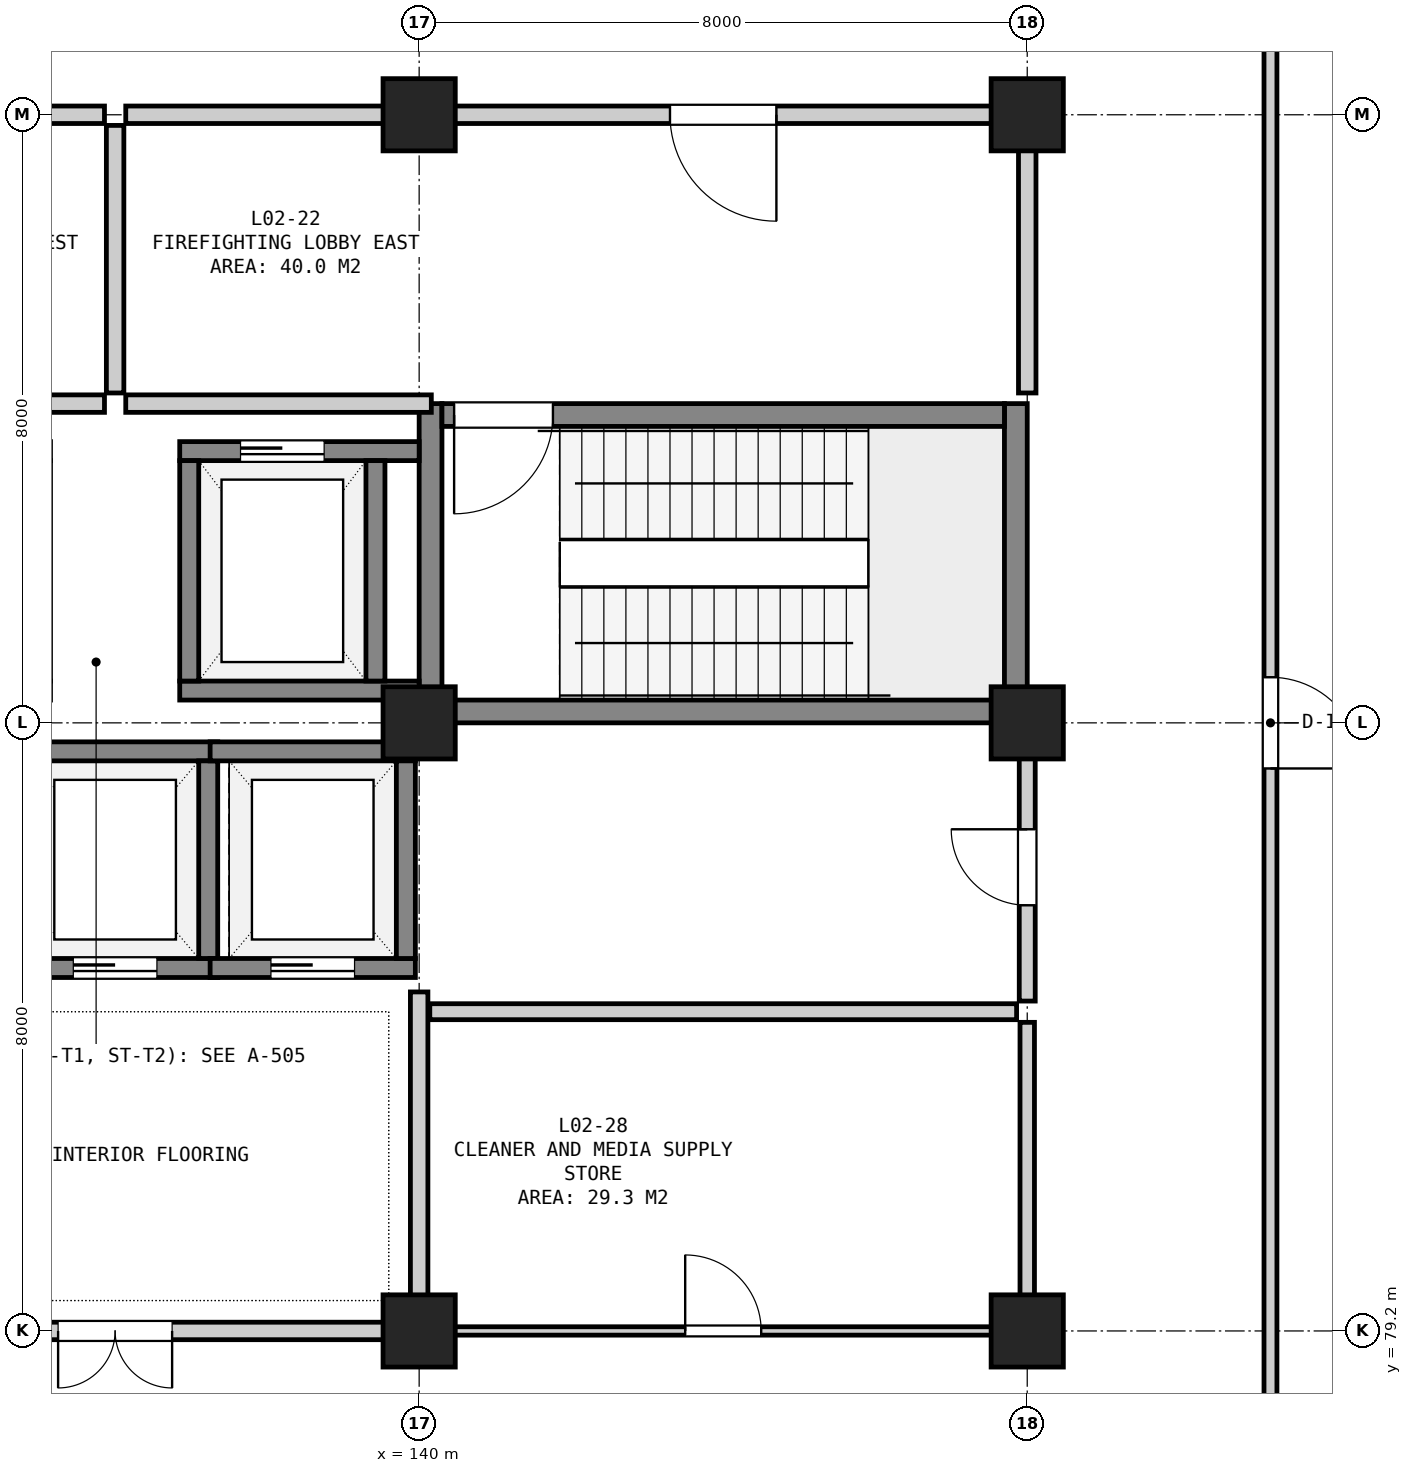
"""IFC4 building model, lengths in metres.
Left out: names, types, materials, properties, quantities, classifications, styles, units other than length and angle.
Written with IfcOpenShell. Run it as: python <this file> out.ifc"""

import sys

from ifc_helpers import new_model, si_unit, direction, frame, frame_2d, origin, origin_2d, place, context, subcontext, project, spatial, rectangle, extrude, element, fill, save


model = new_model("IFC4")
c1 = context("Model", 3, precision=1e-05, world=origin(), true_north=direction((0.0, 1.0)))
c2 = subcontext(c1, "Body", "Model", "MODEL_VIEW")
j1 = project(units=[si_unit("LENGTHUNIT", "METRE"), si_unit("PLANEANGLEUNIT", "RADIAN")], contexts=[c1])
p1 = place(None, origin())
s1 = spatial("IfcSite", under=j1, at=p1, CompositionType="ELEMENT")
p2 = place(p1, origin())
s2 = spatial("IfcBuilding", under=s1, at=p2, CompositionType="ELEMENT")
p3 = place(p2, frame((0.0, 0.0, 10.8)))
s3 = spatial("IfcBuildingStorey", under=s2, at=p3, CompositionType="ELEMENT", Elevation=10.8)
for number, where, z_axis, x_axis in (
    (1, (140.0, 79.2, 0.0), (0.0, 0.0, 1.0), (1.0, 0.0, 0.0)),
    (2, (140.0, 87.2, 0.0), (0.0, 0.0, 1.0), (1.0, 0.0, 0.0)),
    (3, (140.0, 95.2, 0.0), (0.0, 0.0, 1.0), (1.0, 0.0, 0.0)),
    (4, (148.0, 79.2, 0.0), (0.0, 0.0, 1.0), (1.0, 0.0, 0.0)),
    (5, (148.0, 87.2, 0.0), (0.0, 0.0, 1.0), (1.0, 0.0, 0.0)),
    (6, (148.0, 95.2, 0.0), (0.0, 0.0, 1.0), (1.0, 0.0, 0.0)),
):
    element("IfcColumn", number, at=place(p3, frame(where, z_axis=z_axis, x_axis=x_axis)), inside=s3, PredefinedType="COLUMN", context=c2, shape_type="SweptSolid", body=[
        extrude(rectangle(XDim=0.95, YDim=0.95, at=origin_2d()), origin(), (0.0, 0.0, 1.0), 4.8),
    ])
for number, where, z_axis, x_axis in (
    (7, (140.15, 87.2, 0.0), (0.0, 0.0, 1.0), (0.0, 1.0, 0.0)),
    (8, (147.85, 87.2, 0.0), (0.0, 0.0, 1.0), (0.0, 1.0, 0.0)),
):
    element("IfcWall", number, at=place(p3, frame(where, z_axis=z_axis, x_axis=x_axis)), inside=s3, PredefinedType="SHEAR", context=c2, shape_type="SweptSolid", body=[
        extrude(rectangle(XDim=4.2, YDim=0.3, at=frame_2d((2.1, 0.0))), origin(), (0.0, 0.0, 1.0), 4.5),
    ])
p4 = place(p3, frame((140.3, 87.35, 0.0), z_axis=(0.0, 0.0, 1.0), x_axis=(1.0, 0.0, 0.0)))
e9 = element("IfcWall", 9, at=p4, inside=s3, PredefinedType="SHEAR", context=c2, shape_type="SweptSolid", body=[
    extrude(rectangle(XDim=7.4, YDim=0.3, at=frame_2d((3.7, 0.0))), origin(), (0.0, 0.0, 1.0), 4.5),
])
p5 = place(p3, frame((140.3, 91.25, 0.0), z_axis=(0.0, 0.0, 1.0), x_axis=(1.0, 0.0, 0.0)))
e10 = element("IfcWall", 10, at=p5, inside=s3, PredefinedType="SHEAR", context=c2, shape_type="SweptSolid", body=[
    extrude(rectangle(XDim=7.4, YDim=0.3, at=frame_2d((3.7, 0.0))), origin(), (0.0, 0.0, 1.0), 4.5),
])
p6 = place(p5, frame((0.16, 0.0, 0.0)))
e11 = element("IfcOpeningElement", 11, at=p6, cuts=e10, PredefinedType="OPENING", context=c2, shape_type="SweptSolid", body=[
    extrude(rectangle(XDim=1.3, YDim=2.18, at=frame_2d((0.65, 1.09))), frame((0.0, 0.162, 0.0), z_axis=(0.0, -1.0, 0.0), x_axis=(1.0, 0.0, 0.0)), (0.0, 0.0, 1.0), 0.324),
])
p7 = place(p3, frame((136.85, 87.625, 0.0), z_axis=(0.0, 0.0, 1.0), x_axis=(1.0, 0.0, 0.0)))
e12 = element("IfcWall", 12, at=p7, inside=s3, PredefinedType="SHEAR", context=c2, shape_type="SweptSolid", body=[
    extrude(rectangle(XDim=3.15, YDim=0.25, at=frame_2d((1.575, 0.0))), origin(), (0.0, 0.0, 1.0), 4.5),
])
p8 = place(p3, frame((136.85, 90.775, 0.0), z_axis=(0.0, 0.0, 1.0), x_axis=(1.0, 0.0, 0.0)))
e13 = element("IfcWall", 13, at=p8, inside=s3, PredefinedType="SHEAR", context=c2, shape_type="SweptSolid", body=[
    extrude(rectangle(XDim=3.15, YDim=0.25, at=frame_2d((1.575, 0.0))), origin(), (0.0, 0.0, 1.0), 4.5),
])
p9 = place(p8, frame((0.8, 0.0, 0.0)))
e14 = element("IfcOpeningElement", 14, at=p9, cuts=e13, PredefinedType="OPENING", context=c2, shape_type="SweptSolid", body=[
    extrude(rectangle(XDim=1.1, YDim=2.15, at=frame_2d((0.55, 1.075))), frame((0.0, 0.137, 0.0), z_axis=(0.0, -1.0, 0.0), x_axis=(1.0, 0.0, 0.0)), (0.0, 0.0, 1.0), 0.274),
])
for number, where, z_axis, x_axis in (
    (15, (136.975, 87.75, 0.0), (0.0, 0.0, 1.0), (0.0, 1.0, 0.0)),
    (16, (139.425, 87.75, 0.0), (0.0, 0.0, 1.0), (0.0, 1.0, 0.0)),
):
    element("IfcWall", number, at=place(p3, frame(where, z_axis=z_axis, x_axis=x_axis)), inside=s3, PredefinedType="SHEAR", context=c2, shape_type="SweptSolid", body=[
        extrude(rectangle(XDim=2.9, YDim=0.25, at=frame_2d((1.45, 0.0))), origin(), (0.0, 0.0, 1.0), 4.5),
    ])
p10 = place(p3, frame((134.65, 83.975, 0.0), z_axis=(0.0, 0.0, 1.0), x_axis=(1.0, 0.0, 0.0)))
e17 = element("IfcWall", 17, at=p10, inside=s3, PredefinedType="SHEAR", context=c2, shape_type="SweptSolid", body=[
    extrude(rectangle(XDim=2.7, YDim=0.25, at=frame_2d((1.35, 0.0))), origin(), (0.0, 0.0, 1.0), 4.5),
])
p11 = place(p10, frame((0.8, 0.0, 0.0)))
e18 = element("IfcOpeningElement", 18, at=p11, cuts=e17, PredefinedType="OPENING", context=c2, shape_type="SweptSolid", body=[
    extrude(rectangle(XDim=1.1, YDim=2.15, at=frame_2d((0.55, 1.075))), frame((0.0, 0.137, 0.0), z_axis=(0.0, -1.0, 0.0), x_axis=(1.0, 0.0, 0.0)), (0.0, 0.0, 1.0), 0.274),
])
p12 = place(p3, frame((134.65, 86.825, 0.0), z_axis=(0.0, 0.0, 1.0), x_axis=(1.0, 0.0, 0.0)))
e19 = element("IfcWall", 19, at=p12, inside=s3, PredefinedType="SHEAR", context=c2, shape_type="SweptSolid", body=[
    extrude(rectangle(XDim=2.7, YDim=0.25, at=frame_2d((1.35, 0.0))), origin(), (0.0, 0.0, 1.0), 4.5),
])
p13 = place(p3, frame((137.225, 84.1, 0.0), z_axis=(0.0, 0.0, 1.0), x_axis=(0.0, 1.0, 0.0)))
e20 = element("IfcWall", 20, at=p13, inside=s3, PredefinedType="SHEAR", context=c2, shape_type="SweptSolid", body=[
    extrude(rectangle(XDim=2.6, YDim=0.25, at=frame_2d((1.3, 0.0))), origin(), (0.0, 0.0, 1.0), 4.5),
])
p14 = place(p3, frame((137.25, 83.975, 0.0), z_axis=(0.0, 0.0, 1.0), x_axis=(1.0, 0.0, 0.0)))
e21 = element("IfcWall", 21, at=p14, inside=s3, PredefinedType="SHEAR", context=c2, shape_type="SweptSolid", body=[
    extrude(rectangle(XDim=2.7, YDim=0.25, at=frame_2d((1.35, 0.0))), origin(), (0.0, 0.0, 1.0), 4.5),
])
p15 = place(p14, frame((0.8, 0.0, 0.0)))
e22 = element("IfcOpeningElement", 22, at=p15, cuts=e21, PredefinedType="OPENING", context=c2, shape_type="SweptSolid", body=[
    extrude(rectangle(XDim=1.1, YDim=2.15, at=frame_2d((0.55, 1.075))), frame((0.0, 0.137, 0.0), z_axis=(0.0, -1.0, 0.0), x_axis=(1.0, 0.0, 0.0)), (0.0, 0.0, 1.0), 0.274),
])
p16 = place(p3, frame((137.25, 86.825, 0.0), z_axis=(0.0, 0.0, 1.0), x_axis=(1.0, 0.0, 0.0)))
e23 = element("IfcWall", 23, at=p16, inside=s3, PredefinedType="SHEAR", context=c2, shape_type="SweptSolid", body=[
    extrude(rectangle(XDim=2.7, YDim=0.25, at=frame_2d((1.35, 0.0))), origin(), (0.0, 0.0, 1.0), 4.5),
])
p17 = place(p3, frame((139.825, 84.1, 0.0), z_axis=(0.0, 0.0, 1.0), x_axis=(0.0, 1.0, 0.0)))
e24 = element("IfcWall", 24, at=p17, inside=s3, PredefinedType="SHEAR", context=c2, shape_type="SweptSolid", body=[
    extrude(rectangle(XDim=2.6, YDim=0.25, at=frame_2d((1.3, 0.0))), origin(), (0.0, 0.0, 1.0), 4.5),
])
p18 = place(p3, frame((131.84, 91.4, 0.0), z_axis=(0.0, 0.0, 1.0), x_axis=(1.0, 0.0, 0.0)))
e25 = element("IfcWall", 25, at=p18, inside=s3, PredefinedType="SOLIDWALL", context=c2, shape_type="SweptSolid", body=[
    extrude(rectangle(XDim=4.02, YDim=0.23, at=frame_2d((2.01, 0.0))), origin(), (0.0, 0.0, 1.0), 4.5),
])
p19 = place(p3, frame((124.14, 95.2, 0.0), z_axis=(0.0, 0.0, 1.0), x_axis=(1.0, 0.0, 0.0)))
e26 = element("IfcWall", 26, at=p19, inside=s3, PredefinedType="SOLIDWALL", context=c2, shape_type="SweptSolid", body=[
    extrude(rectangle(XDim=11.72, YDim=0.23, at=frame_2d((5.86, 0.0))), origin(), (0.0, 0.0, 1.0), 3.645),
])
p20 = place(p19, frame((3.16, 0.0, 0.0)))
e27 = element("IfcOpeningElement", 27, at=p20, cuts=e26, PredefinedType="OPENING", context=c2, shape_type="SweptSolid", body=[
    extrude(rectangle(XDim=1.4, YDim=2.2, at=frame_2d((0.7, 1.1))), frame((0.0, 0.127, 0.0), z_axis=(0.0, -1.0, 0.0), x_axis=(1.0, 0.0, 0.0)), (0.0, 0.0, 1.0), 0.254),
])
p21 = place(p3, frame((136.0, 91.54, 0.0), z_axis=(0.0, 0.0, 1.0), x_axis=(0.0, 1.0, 0.0)))
e28 = element("IfcWall", 28, at=p21, inside=s3, PredefinedType="SOLIDWALL", context=c2, shape_type="SweptSolid", body=[
    extrude(rectangle(XDim=3.52, YDim=0.23, at=frame_2d((1.76, 0.0))), origin(), (0.0, 0.0, 1.0), 4.5),
])
p22 = place(p3, frame((136.14, 91.4, 0.0), z_axis=(0.0, 0.0, 1.0), x_axis=(1.0, 0.0, 0.0)))
e29 = element("IfcWall", 29, at=p22, inside=s3, PredefinedType="SOLIDWALL", context=c2, shape_type="SweptSolid", body=[
    extrude(rectangle(XDim=4.02, YDim=0.23, at=frame_2d((2.01, 0.0))), origin(), (0.0, 0.0, 1.0), 4.5),
])
p23 = place(p3, frame((136.14, 95.2, 0.0), z_axis=(0.0, 0.0, 1.0), x_axis=(1.0, 0.0, 0.0)))
e30 = element("IfcWall", 30, at=p23, inside=s3, PredefinedType="SOLIDWALL", context=c2, shape_type="SweptSolid", body=[
    extrude(rectangle(XDim=11.72, YDim=0.23, at=frame_2d((5.86, 0.0))), origin(), (0.0, 0.0, 1.0), 3.695),
])
p24 = place(p23, frame((7.16, 0.0, 0.0)))
e31 = element("IfcOpeningElement", 31, at=p24, cuts=e30, PredefinedType="OPENING", context=c2, shape_type="SweptSolid", body=[
    extrude(rectangle(XDim=1.4, YDim=2.2, at=frame_2d((0.7, 1.1))), frame((0.0, 0.127, 0.0), z_axis=(0.0, -1.0, 0.0), x_axis=(1.0, 0.0, 0.0)), (0.0, 0.0, 1.0), 0.254),
])
p25 = place(p3, frame((148.0, 91.54, 0.0), z_axis=(0.0, 0.0, 1.0), x_axis=(0.0, 1.0, 0.0)))
e32 = element("IfcWall", 32, at=p25, inside=s3, PredefinedType="SOLIDWALL", context=c2, shape_type="SweptSolid", body=[
    extrude(rectangle(XDim=3.52, YDim=0.23, at=frame_2d((1.76, 0.0))), origin(), (0.0, 0.0, 1.0), 3.795),
])
p26 = place(p3, frame((132.14, 79.2, 0.0), z_axis=(0.0, 0.0, 1.0), x_axis=(1.0, 0.0, 0.0)))
e33 = element("IfcWall", 33, at=p26, inside=s3, PredefinedType="SOLIDWALL", context=c2, shape_type="SweptSolid", body=[
    extrude(rectangle(XDim=7.72, YDim=0.23, at=frame_2d((3.86, 0.0))), origin(), (0.0, 0.0, 1.0), 3.995),
])
p27 = place(p26, frame((3.11, 0.0, 0.0)))
e34 = element("IfcOpeningElement", 34, at=p27, cuts=e33, PredefinedType="OPENING", context=c2, shape_type="SweptSolid", body=[
    extrude(rectangle(XDim=1.5, YDim=2.2, at=frame_2d((0.75, 1.1))), frame((0.0, 0.127, 0.0), z_axis=(0.0, -1.0, 0.0), x_axis=(1.0, 0.0, 0.0)), (0.0, 0.0, 1.0), 0.254),
])
p28 = place(p3, frame((140.0, 79.34, 0.0), z_axis=(0.0, 0.0, 1.0), x_axis=(0.0, 1.0, 0.0)))
e35 = element("IfcWall", 35, at=p28, inside=s3, PredefinedType="SOLIDWALL", context=c2, shape_type="SweptSolid", body=[
    extrude(rectangle(XDim=4.32, YDim=0.23, at=frame_2d((2.16, 0.0))), origin(), (0.0, 0.0, 1.0), 3.895),
])
p29 = place(p3, frame((140.14, 83.4, 0.0), z_axis=(0.0, 0.0, 1.0), x_axis=(1.0, 0.0, 0.0)))
e36 = element("IfcWall", 36, at=p29, inside=s3, PredefinedType="SOLIDWALL", context=c2, shape_type="SweptSolid", body=[
    extrude(rectangle(XDim=7.72, YDim=0.21, at=frame_2d((3.86, 0.0))), origin(), (0.0, 0.0, 1.0), 4.5),
])
p30 = place(p3, frame((148.0, 83.54, 0.0), z_axis=(0.0, 0.0, 1.0), x_axis=(0.0, 1.0, 0.0)))
e37 = element("IfcWall", 37, at=p30, inside=s3, PredefinedType="SOLIDWALL", context=c2, shape_type="SweptSolid", body=[
    extrude(rectangle(XDim=3.52, YDim=0.21, at=frame_2d((1.76, 0.0))), origin(), (0.0, 0.0, 1.0), 3.745),
])
p31 = place(p30, frame((1.26, 0.0, 0.0)))
e38 = element("IfcOpeningElement", 38, at=p31, cuts=e37, PredefinedType="OPENING", context=c2, shape_type="SweptSolid", body=[
    extrude(rectangle(XDim=1.0, YDim=2.15, at=frame_2d((0.5, 1.075))), frame((0.0, 0.117, 0.0), z_axis=(0.0, -1.0, 0.0), x_axis=(1.0, 0.0, 0.0)), (0.0, 0.0, 1.0), 0.234),
])
p32 = place(p3, frame((140.14, 79.2, 0.0), z_axis=(0.0, 0.0, 1.0), x_axis=(1.0, 0.0, 0.0)))
e39 = element("IfcWall", 39, at=p32, inside=s3, PredefinedType="PARTITIONING", context=c2, shape_type="SweptSolid", body=[
    extrude(rectangle(XDim=7.72, YDim=0.11, at=frame_2d((3.86, 0.0))), origin(), (0.0, 0.0, 1.0), 3.995),
])
p33 = place(p32, frame((3.36, 0.0, 0.0)))
e40 = element("IfcOpeningElement", 40, at=p33, cuts=e39, PredefinedType="OPENING", context=c2, shape_type="SweptSolid", body=[
    extrude(rectangle(XDim=1.0, YDim=2.15, at=frame_2d((0.5, 1.075))), frame((0.0, 0.067, 0.0), z_axis=(0.0, -1.0, 0.0), x_axis=(1.0, 0.0, 0.0)), (0.0, 0.0, 1.0), 0.134),
])
p34 = place(p3, frame((148.0, 79.34, 0.0), z_axis=(0.0, 0.0, 1.0), x_axis=(0.0, 1.0, 0.0)))
e41 = element("IfcWall", 41, at=p34, inside=s3, PredefinedType="PARTITIONING", context=c2, shape_type="SweptSolid", body=[
    extrude(rectangle(XDim=3.92, YDim=0.19, at=frame_2d((1.96, 0.0))), origin(), (0.0, 0.0, 1.0), 3.745),
])
p35 = place(p3, frame((151.2, 76.14, 0.0), z_axis=(0.0, 0.0, 1.0), x_axis=(0.0, 1.0, 0.0)))
e42 = element("IfcWall", 42, at=p35, inside=s3, PredefinedType="PARTITIONING", context=c2, shape_type="SweptSolid", body=[
    extrude(rectangle(XDim=22.12, YDim=0.17, at=frame_2d((11.06, 0.0))), origin(), (0.0, 0.0, 1.0), 4.5),
])
p36 = place(p35, frame((10.46, 0.0, 0.0)))
e43 = element("IfcOpeningElement", 43, at=p36, cuts=e42, PredefinedType="OPENING", context=c2, shape_type="SweptSolid", body=[
    extrude(rectangle(XDim=1.2, YDim=2.15, at=frame_2d((0.6, 1.075))), frame((0.0, 0.097, 0.0), z_axis=(0.0, -1.0, 0.0), x_axis=(1.0, 0.0, 0.0)), (0.0, 0.0, 1.0), 0.194),
])
p37 = place(p6, frame((1.3, 0.0, 0.0), z_axis=(0.0, 0.0, 1.0), x_axis=(-1.0, 0.0, 0.0)))
e44 = element("IfcDoor", 44, at=p37, inside=s3, OperationType="SINGLE_SWING_RIGHT", PredefinedType="DOOR", context=c2, shape_type="SweptSolid", body=[
    extrude(rectangle(XDim=1.3, YDim=2.18, at=frame_2d((0.65, 1.09))), frame((0.0, 0.025, 0.0), z_axis=(0.0, -1.0, 0.0), x_axis=(1.0, 0.0, 0.0)), (0.0, 0.0, 1.0), 0.05),
])
fill(e11, e44)
p38 = place(p9, origin())
e45 = element("IfcDoor", 45, at=p38, inside=s3, OperationType="SLIDING_TO_LEFT", PredefinedType="DOOR", context=c2, shape_type="SweptSolid", body=[
    extrude(rectangle(XDim=1.1, YDim=2.15, at=frame_2d((0.55, 1.075))), frame((0.0, 0.025, 0.0), z_axis=(0.0, -1.0, 0.0), x_axis=(1.0, 0.0, 0.0)), (0.0, 0.0, 1.0), 0.05),
])
fill(e14, e45)
p39 = place(p11, origin())
e46 = element("IfcDoor", 46, at=p39, inside=s3, OperationType="SLIDING_TO_LEFT", PredefinedType="DOOR", context=c2, shape_type="SweptSolid", body=[
    extrude(rectangle(XDim=1.1, YDim=2.15, at=frame_2d((0.55, 1.075))), frame((0.0, 0.025, 0.0), z_axis=(0.0, -1.0, 0.0), x_axis=(1.0, 0.0, 0.0)), (0.0, 0.0, 1.0), 0.05),
])
fill(e18, e46)
p40 = place(p15, origin())
e47 = element("IfcDoor", 47, at=p40, inside=s3, OperationType="SLIDING_TO_LEFT", PredefinedType="DOOR", context=c2, shape_type="SweptSolid", body=[
    extrude(rectangle(XDim=1.1, YDim=2.15, at=frame_2d((0.55, 1.075))), frame((0.0, 0.025, 0.0), z_axis=(0.0, -1.0, 0.0), x_axis=(1.0, 0.0, 0.0)), (0.0, 0.0, 1.0), 0.05),
])
fill(e22, e47)
p41 = place(p24, frame((1.4, 0.0, 0.0), z_axis=(0.0, 0.0, 1.0), x_axis=(-1.0, 0.0, 0.0)))
e48 = element("IfcDoor", 48, at=p41, inside=s3, OperationType="SINGLE_SWING_LEFT", PredefinedType="DOOR", context=c2, shape_type="SweptSolid", body=[
    extrude(rectangle(XDim=1.4, YDim=2.2, at=frame_2d((0.7, 1.1))), frame((0.0, 0.025, 0.0), z_axis=(0.0, -1.0, 0.0), x_axis=(1.0, 0.0, 0.0)), (0.0, 0.0, 1.0), 0.05),
])
fill(e31, e48)
p42 = place(p27, frame((1.5, 0.0, 0.0), z_axis=(0.0, 0.0, 1.0), x_axis=(-1.0, 0.0, 0.0)))
e49 = element("IfcDoor", 49, at=p42, inside=s3, OperationType="DOUBLE_DOOR_SINGLE_SWING", PredefinedType="DOOR", context=c2, shape_type="SweptSolid", body=[
    extrude(rectangle(XDim=1.5, YDim=2.2, at=frame_2d((0.75, 1.1))), frame((0.0, 0.025, 0.0), z_axis=(0.0, -1.0, 0.0), x_axis=(1.0, 0.0, 0.0)), (0.0, 0.0, 1.0), 0.05),
])
fill(e34, e49)
p43 = place(p31, origin())
e50 = element("IfcDoor", 50, at=p43, inside=s3, OperationType="SINGLE_SWING_RIGHT", PredefinedType="DOOR", context=c2, shape_type="SweptSolid", body=[
    extrude(rectangle(XDim=1.0, YDim=2.15, at=frame_2d((0.5, 1.075))), frame((0.0, 0.025, 0.0), z_axis=(0.0, -1.0, 0.0), x_axis=(1.0, 0.0, 0.0)), (0.0, 0.0, 1.0), 0.05),
])
fill(e38, e50)
p44 = place(p33, origin())
e51 = element("IfcDoor", 51, at=p44, inside=s3, OperationType="SINGLE_SWING_LEFT", PredefinedType="DOOR", context=c2, shape_type="SweptSolid", body=[
    extrude(rectangle(XDim=1.0, YDim=2.15, at=frame_2d((0.5, 1.075))), frame((0.0, 0.025, 0.0), z_axis=(0.0, -1.0, 0.0), x_axis=(1.0, 0.0, 0.0)), (0.0, 0.0, 1.0), 0.05),
])
fill(e40, e51)
p45 = place(p36, frame((1.2, 0.0, 0.0), z_axis=(0.0, 0.0, 1.0), x_axis=(-1.0, 0.0, 0.0)))
e52 = element("IfcDoor", 52, at=p45, inside=s3, OperationType="SINGLE_SWING_RIGHT", PredefinedType="DOOR", context=c2, shape_type="SweptSolid", body=[
    extrude(rectangle(XDim=1.2, YDim=2.15, at=frame_2d((0.6, 1.075))), frame((0.0, 0.025, 0.0), z_axis=(0.0, -1.0, 0.0), x_axis=(1.0, 0.0, 0.0)), (0.0, 0.0, 1.0), 0.05),
])
fill(e43, e52)
save(model, sys.argv[1])
